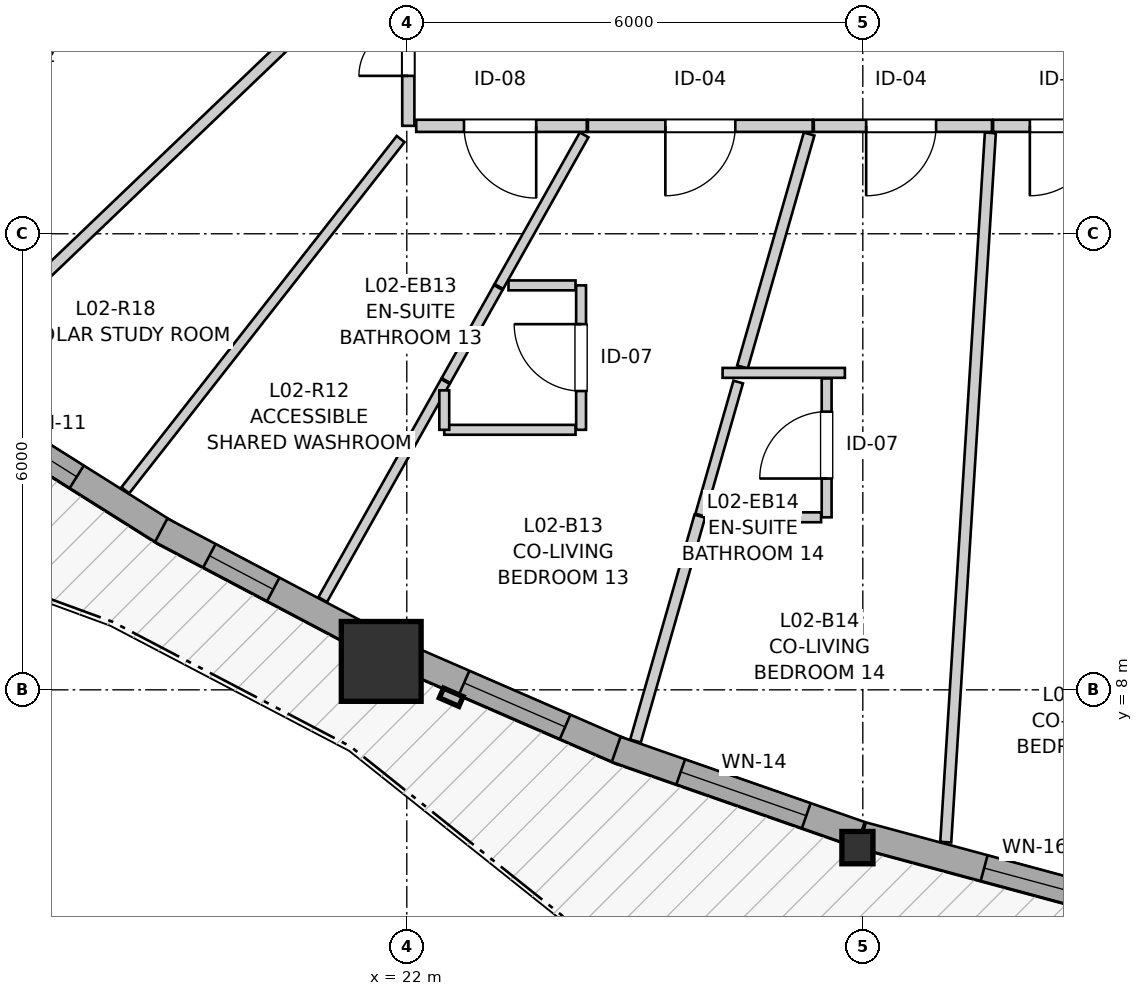
"""IFC4 building model, lengths in metres.
Left out: names, types, materials, properties, quantities, classifications, styles, units other than length and angle.
Written with IfcOpenShell. Run it as: python <this file> out.ifc"""

import sys

from ifc_helpers import new_model, si_unit, direction, frame, frame_2d, origin, origin_2d, place, context, subcontext, project, spatial, rectangle, i_section, extrude, source, transform, mapped, element, fill, save


model = new_model("IFC4")
c1 = context("Model", 3, precision=1e-05, world=origin(), true_north=direction((0.0, 1.0)))
c2 = subcontext(c1, "Body", "Model", "MODEL_VIEW")
j1 = project(units=[si_unit("LENGTHUNIT", "METRE"), si_unit("PLANEANGLEUNIT", "RADIAN")], contexts=[c1])
p1 = place(None, origin())
s1 = spatial("IfcSite", under=j1, at=p1, CompositionType="ELEMENT")
p2 = place(p1, origin())
s2 = spatial("IfcBuilding", under=s1, at=p2, CompositionType="ELEMENT")
p3 = place(p2, frame((0.0, 0.0, 11.0)))
s3 = spatial("IfcBuildingStorey", under=s2, at=p3, CompositionType="ELEMENT", Elevation=11.0)
m1 = source(origin(), c2, "Body", "SweptSolid", [
    extrude(rectangle(XDim=1.05, YDim=1.05, at=origin_2d()), origin(), (0.0, 0.0, 1.0), 2.94),
])
p4 = place(p3, frame((21.664, 8.374, 0.0), z_axis=(0.0, 0.0, 1.0), x_axis=(1.0, 0.0, 0.0)))
e1 = element("IfcColumn", 1, at=p4, inside=s3, PredefinedType="COLUMN", context=c2, shape_type="MappedRepresentation", body=[
    mapped(m1, transform((0.0, 0.0, 0.0), x_axis=(1.0, 0.0, 0.0), y_axis=(0.0, 1.0, 0.0), z_axis=(0.0, 0.0, 1.0), scale=1.0)),
])
m2 = source(origin(), c2, "Body", "SweptSolid", [
    extrude(i_section(OverallWidth=0.409, OverallDepth=0.425, WebThickness=0.03, FlangeThickness=0.048, FilletRadius=0.015, at=origin_2d()), origin(), (0.0, 0.0, 1.0), 2.94),
])
p5 = place(p3, frame((27.929, 5.924, 0.0), z_axis=(0.0, 0.0, 1.0), x_axis=(1.0, 0.0, 0.0)))
e2 = element("IfcColumn", 2, at=p5, inside=s3, PredefinedType="PILASTER", context=c2, shape_type="MappedRepresentation", body=[
    mapped(m2, transform((0.0, 0.0, 0.0), x_axis=(1.0, 0.0, 0.0), y_axis=(0.0, 1.0, 0.0), z_axis=(0.0, 0.0, 1.0), scale=1.0)),
])
p6 = place(p3, frame((16.014, 11.837, 0.0), z_axis=(0.0, 0.0, 1.0), x_axis=(0.846420438233, -0.532515203295, 0.0)))
e3 = element("IfcWall", 3, at=p6, inside=s3, PredefinedType="SOLIDWALL", context=c2, shape_type="SweptSolid", body=[
    extrude(rectangle(XDim=3.346, YDim=0.35, at=frame_2d((1.673, 0.0))), origin(), (0.0, 0.0, 1.0), 2.42),
])
p7 = place(p6, frame((0.692, 0.0, 0.82)))
e4 = element("IfcOpeningElement", 4, at=p7, cuts=e3, PredefinedType="OPENING", context=c2, shape_type="SweptSolid", body=[
    extrude(rectangle(XDim=1.25, YDim=1.35, at=frame_2d((0.625, 0.675))), frame((0.0, 0.185, 0.0), z_axis=(0.0, -1.0, 0.0), x_axis=(1.0, 0.0, 0.0)), (0.0, 0.0, 1.0), 0.37),
])
p8 = place(p3, frame((18.769, 10.1, 0.0), z_axis=(0.0, 0.0, 1.0), x_axis=(0.884401188265, -0.466727477438, 0.0)))
e5 = element("IfcWall", 5, at=p8, inside=s3, PredefinedType="SOLIDWALL", context=c2, shape_type="SweptSolid", body=[
    extrude(rectangle(XDim=3.066, YDim=0.35, at=frame_2d((1.533, 0.0))), origin(), (0.0, 0.0, 1.0), 2.42),
])
p9 = place(p8, frame((0.717, 0.0, 0.82)))
e6 = element("IfcOpeningElement", 6, at=p9, cuts=e5, PredefinedType="OPENING", context=c2, shape_type="SweptSolid", body=[
    extrude(rectangle(XDim=0.95, YDim=1.35, at=frame_2d((0.475, 0.675))), frame((0.0, 0.185, 0.0), z_axis=(0.0, -1.0, 0.0), x_axis=(1.0, 0.0, 0.0)), (0.0, 0.0, 1.0), 0.37),
])
p10 = place(p3, frame((22.009, 8.415, 0.0), z_axis=(0.0, 0.0, 1.0), x_axis=(0.917077605242, -0.398708748292, 0.0)))
e7 = element("IfcWall", 7, at=p10, inside=s3, PredefinedType="SOLIDWALL", context=c2, shape_type="SweptSolid", body=[
    extrude(rectangle(XDim=3.085, YDim=0.35, at=frame_2d((1.542, 0.0))), origin(), (0.0, 0.0, 1.0), 2.42),
])
p11 = place(p10, frame((0.812, 0.0, 0.82)))
e8 = element("IfcOpeningElement", 8, at=p11, cuts=e7, PredefinedType="OPENING", context=c2, shape_type="SweptSolid", body=[
    extrude(rectangle(XDim=1.45, YDim=1.25, at=frame_2d((0.725, 0.625))), frame((0.0, 0.185, 0.0), z_axis=(0.0, -1.0, 0.0), x_axis=(1.0, 0.0, 0.0)), (0.0, 0.0, 1.0), 0.37),
])
p12 = place(p3, frame((24.755, 7.217, 0.0), z_axis=(0.0, 0.0, 1.0), x_axis=(0.944148800827, -0.329519410501, 0.0)))
e9 = element("IfcWall", 9, at=p12, inside=s3, PredefinedType="SOLIDWALL", context=c2, shape_type="SweptSolid", body=[
    extrude(rectangle(XDim=3.403, YDim=0.35, at=frame_2d((1.701, 0.0))), origin(), (0.0, 0.0, 1.0), 2.42),
])
p13 = place(p12, frame((0.899, 0.0, 0.82)))
e10 = element("IfcOpeningElement", 10, at=p13, cuts=e9, PredefinedType="OPENING", context=c2, shape_type="SweptSolid", body=[
    extrude(rectangle(XDim=1.75, YDim=1.3, at=frame_2d((0.875, 0.65))), frame((0.0, 0.185, 0.0), z_axis=(0.0, -1.0, 0.0), x_axis=(1.0, 0.0, 0.0)), (0.0, 0.0, 1.0), 0.37),
])
p14 = place(p3, frame((27.994, 6.088, 0.0), z_axis=(0.0, 0.0, 1.0), x_axis=(0.965452701472, -0.260578359079, 0.0)))
e11 = element("IfcWall", 11, at=p14, inside=s3, PredefinedType="SOLIDWALL", context=c2, shape_type="SweptSolid", body=[
    extrude(rectangle(XDim=3.459, YDim=0.35, at=frame_2d((1.729, 0.0))), origin(), (0.0, 0.0, 1.0), 2.42),
])
p15 = place(p14, frame((1.66, 0.0, 0.82)))
e12 = element("IfcOpeningElement", 12, at=p15, cuts=e11, PredefinedType="OPENING", context=c2, shape_type="SweptSolid", body=[
    extrude(rectangle(XDim=1.15, YDim=1.2, at=frame_2d((0.575, 0.6))), frame((0.0, 0.185, 0.0), z_axis=(0.0, -1.0, 0.0), x_axis=(1.0, 0.0, 0.0)), (0.0, 0.0, 1.0), 0.37),
])
p16 = place(p3, frame((27.34, 15.42, 0.0), z_axis=(0.0, 0.0, 1.0), x_axis=(-1.0, 0.0, 0.0)))
e13 = element("IfcWall", 13, at=p16, inside=s3, PredefinedType="PARTITIONING", context=c2, shape_type="SweptSolid", body=[
    extrude(rectangle(XDim=2.957, YDim=0.16, at=frame_2d((1.479, 0.0))), origin(), (0.0, 0.0, 1.0), 2.94),
])
p17 = place(p16, frame((1.018, 0.0, 0.0)))
e14 = element("IfcOpeningElement", 14, at=p17, cuts=e13, PredefinedType="OPENING", context=c2, shape_type="SweptSolid", body=[
    extrude(rectangle(XDim=0.92, YDim=2.1, at=frame_2d((0.46, 1.05))), frame((0.0, 0.09, 0.0), z_axis=(0.0, -1.0, 0.0), x_axis=(1.0, 0.0, 0.0)), (0.0, 0.0, 1.0), 0.18),
])
p18 = place(p3, frame((22.02, 15.42, 0.0), z_axis=(0.0, 0.0, 1.0), x_axis=(0.0, 1.0, 0.0)))
e15 = element("IfcWall", 15, at=p18, inside=s3, PredefinedType="PARTITIONING", context=c2, shape_type="SweptSolid", body=[
    extrude(rectangle(XDim=2.579, YDim=0.16, at=frame_2d((1.29, 0.0))), origin(), (0.0, 0.0, 1.0), 2.94),
])
p19 = place(p18, frame((0.657, 0.0, 0.0)))
e16 = element("IfcOpeningElement", 16, at=p19, cuts=e15, PredefinedType="OPENING", context=c2, shape_type="SweptSolid", body=[
    extrude(rectangle(XDim=1.3, YDim=2.1, at=frame_2d((0.65, 1.05))), frame((0.0, 0.09, 0.0), z_axis=(0.0, -1.0, 0.0), x_axis=(1.0, 0.0, 0.0)), (0.0, 0.0, 1.0), 0.18),
])
p20 = place(p3, frame((29.699, 15.42, 0.0), z_axis=(0.0, 0.0, 1.0), x_axis=(-1.0, 0.0, 0.0)))
e17 = element("IfcWall", 17, at=p20, inside=s3, PredefinedType="PARTITIONING", context=c2, shape_type="SweptSolid", body=[
    extrude(rectangle(XDim=2.344, YDim=0.16, at=frame_2d((1.172, 0.0))), origin(), (0.0, 0.0, 1.0), 2.94),
])
p21 = place(p20, frame((0.735, 0.0, 0.0)))
e18 = element("IfcOpeningElement", 18, at=p21, cuts=e17, PredefinedType="OPENING", context=c2, shape_type="SweptSolid", body=[
    extrude(rectangle(XDim=0.92, YDim=2.1, at=frame_2d((0.46, 1.05))), frame((0.0, 0.09, 0.0), z_axis=(0.0, -1.0, 0.0), x_axis=(1.0, 0.0, 0.0)), (0.0, 0.0, 1.0), 0.18),
])
p22 = place(p3, frame((24.368, 15.42, 0.0), z_axis=(0.0, 0.0, 1.0), x_axis=(-1.0, 0.0, 0.0)))
e19 = element("IfcWall", 19, at=p22, inside=s3, PredefinedType="PARTITIONING", context=c2, shape_type="SweptSolid", body=[
    extrude(rectangle(XDim=2.244, YDim=0.16, at=frame_2d((1.122, 0.0))), origin(), (0.0, 0.0, 1.0), 2.94),
])
p23 = place(p22, frame((0.666, 0.0, 0.0)))
e20 = element("IfcOpeningElement", 20, at=p23, cuts=e19, PredefinedType="OPENING", context=c2, shape_type="SweptSolid", body=[
    extrude(rectangle(XDim=0.95, YDim=2.1, at=frame_2d((0.475, 1.05))), frame((0.0, 0.09, 0.0), z_axis=(0.0, -1.0, 0.0), x_axis=(1.0, 0.0, 0.0)), (0.0, 0.0, 1.0), 0.18),
])
p24 = place(p3, frame((31.646, 15.42, 0.0), z_axis=(0.0, 0.0, 1.0), x_axis=(-1.0, 0.0, 0.0)))
e21 = element("IfcWall", 21, at=p24, inside=s3, PredefinedType="PARTITIONING", context=c2, shape_type="SweptSolid", body=[
    extrude(rectangle(XDim=1.932, YDim=0.16, at=frame_2d((0.966, 0.0))), origin(), (0.0, 0.0, 1.0), 2.94),
])
p25 = place(p24, frame((0.529, 0.0, 0.0)))
e22 = element("IfcOpeningElement", 22, at=p25, cuts=e21, PredefinedType="OPENING", context=c2, shape_type="SweptSolid", body=[
    extrude(rectangle(XDim=0.92, YDim=2.1, at=frame_2d((0.46, 1.05))), frame((0.0, 0.09, 0.0), z_axis=(0.0, -1.0, 0.0), x_axis=(1.0, 0.0, 0.0)), (0.0, 0.0, 1.0), 0.18),
])
p26 = place(p3, frame((24.293, 11.421, 0.0), z_axis=(0.0, 0.0, 1.0), x_axis=(0.0, 1.0, 0.0)))
e23 = element("IfcWall", 23, at=p26, inside=s3, PredefinedType="PARTITIONING", context=c2, shape_type="SweptSolid", body=[
    extrude(rectangle(XDim=1.9, YDim=0.13, at=frame_2d((0.95, 0.0))), origin(), (0.0, 0.0, 1.0), 2.94),
])
p27 = place(p26, frame((0.51, 0.0, 0.0)))
e24 = element("IfcOpeningElement", 24, at=p27, cuts=e23, PredefinedType="OPENING", context=c2, shape_type="SweptSolid", body=[
    extrude(rectangle(XDim=0.88, YDim=2.05, at=frame_2d((0.44, 1.025))), frame((0.0, 0.075, 0.0), z_axis=(0.0, -1.0, 0.0), x_axis=(1.0, 0.0, 0.0)), (0.0, 0.0, 1.0), 0.15),
])
p28 = place(p3, frame((27.524, 10.27, 0.0), z_axis=(0.0, 0.0, 1.0), x_axis=(0.0, 1.0, 0.0)))
e25 = element("IfcWall", 25, at=p28, inside=s3, PredefinedType="PARTITIONING", context=c2, shape_type="SweptSolid", body=[
    extrude(rectangle(XDim=1.827, YDim=0.13, at=frame_2d((0.914, 0.0))), origin(), (0.0, 0.0, 1.0), 2.94),
])
p29 = place(p28, frame((0.51, 0.0, 0.0)))
e26 = element("IfcOpeningElement", 26, at=p29, cuts=e25, PredefinedType="OPENING", context=c2, shape_type="SweptSolid", body=[
    extrude(rectangle(XDim=0.88, YDim=2.05, at=frame_2d((0.44, 1.025))), frame((0.0, 0.075, 0.0), z_axis=(0.0, -1.0, 0.0), x_axis=(1.0, 0.0, 0.0)), (0.0, 0.0, 1.0), 0.15),
])
p30 = place(p3, frame((29.091, 5.996, 0.0), z_axis=(0.0, 0.0, 1.0), x_axis=(0.062797687125, 0.998026277456, 0.0)))
e27 = element("IfcWall", 27, at=p30, inside=s3, PredefinedType="PARTITIONING", context=c2, shape_type="SweptSolid", body=[
    extrude(rectangle(XDim=9.35, YDim=0.145, at=frame_2d((4.675, 0.0))), origin(), (0.0, 0.0, 1.0), 2.94),
])
p31 = place(p3, frame((15.888, 12.171, 0.0), z_axis=(0.0, 0.0, 1.0), x_axis=(0.722733244608, 0.691127091886, 0.0)))
e28 = element("IfcWall", 28, at=p31, inside=s3, PredefinedType="PARTITIONING", context=c2, shape_type="SweptSolid", body=[
    extrude(rectangle(XDim=8.296, YDim=0.145, at=frame_2d((4.148, 0.0))), origin(), (0.0, 0.0, 1.0), 2.94),
])
p32 = place(p3, frame((18.296, 10.625, 0.0), z_axis=(0.0, 0.0, 1.0), x_axis=(0.616906721473, 0.787036274261, 0.0)))
e29 = element("IfcWall", 29, at=p32, inside=s3, PredefinedType="PARTITIONING", context=c2, shape_type="SweptSolid", body=[
    extrude(rectangle(XDim=5.872, YDim=0.13, at=frame_2d((2.936, 0.0))), origin(), (0.0, 0.0, 1.0), 2.94),
])
p33 = place(p3, frame((26.417, 12.248, 0.0), z_axis=(0.0, 0.0, 1.0), x_axis=(0.275014447674, 0.961440093594, 0.0)))
e30 = element("IfcWall", 30, at=p33, inside=s3, PredefinedType="PARTITIONING", context=c2, shape_type="SweptSolid", body=[
    extrude(rectangle(XDim=3.188, YDim=0.145, at=frame_2d((1.594, 0.0))), origin(), (0.0, 0.0, 1.0), 2.94),
])
p34 = place(p3, frame((20.894, 9.187, 0.0), z_axis=(0.0, 0.0, 1.0), x_axis=(0.490433761368, 0.871478471169, 0.0)))
e31 = element("IfcWall", 31, at=p34, inside=s3, PredefinedType="PARTITIONING", context=c2, shape_type="SweptSolid", body=[
    extrude(rectangle(XDim=3.292, YDim=0.13, at=frame_2d((1.646, 0.0))), origin(), (0.0, 0.0, 1.0), 2.94),
])
p35 = place(p3, frame((25.009, 7.327, 0.0), z_axis=(0.0, 0.0, 1.0), x_axis=(0.274867847045, 0.961482015776, 0.0)))
e32 = element("IfcWall", 32, at=p35, inside=s3, PredefinedType="PARTITIONING", context=c2, shape_type="SweptSolid", body=[
    extrude(rectangle(XDim=3.077, YDim=0.145, at=frame_2d((1.538, 0.0))), origin(), (0.0, 0.0, 1.0), 2.94),
])
p36 = place(p3, frame((23.211, 13.306, 0.0), z_axis=(0.0, 0.0, 1.0), x_axis=(0.490235923681, 0.871589776864, 0.0)))
e33 = element("IfcWall", 33, at=p36, inside=s3, PredefinedType="PARTITIONING", context=c2, shape_type="SweptSolid", body=[
    extrude(rectangle(XDim=2.289, YDim=0.13, at=frame_2d((1.145, 0.0))), origin(), (0.0, 0.0, 1.0), 2.94),
])
p37 = place(p3, frame((25.86, 10.299, 0.0), z_axis=(0.0, 0.0, 1.0), x_axis=(0.275022188369, 0.961437879379, 0.0)))
e34 = element("IfcWall", 34, at=p37, inside=s3, PredefinedType="PARTITIONING", context=c2, shape_type="SweptSolid", body=[
    extrude(rectangle(XDim=1.821, YDim=0.13, at=frame_2d((0.91, 0.0))), origin(), (0.0, 0.0, 1.0), 2.94),
])
p38 = place(p3, frame((22.493, 11.421, 0.0), z_axis=(0.0, 0.0, 1.0), x_axis=(1.0, 0.0, 0.0)))
e35 = element("IfcWall", 35, at=p38, inside=s3, PredefinedType="PARTITIONING", context=c2, shape_type="SweptSolid", body=[
    extrude(rectangle(XDim=1.727, YDim=0.13, at=frame_2d((0.864, 0.0))), origin(), (0.0, 0.0, 1.0), 2.508),
])
p39 = place(p3, frame((25.953, 10.27, 0.0), z_axis=(0.0, 0.0, 1.0), x_axis=(1.0, 0.0, 0.0)))
e36 = element("IfcWall", 36, at=p39, inside=s3, PredefinedType="PARTITIONING", context=c2, shape_type="SweptSolid", body=[
    extrude(rectangle(XDim=1.498, YDim=0.13, at=frame_2d((0.749, 0.0))), origin(), (0.0, 0.0, 1.0), 2.508),
])
p40 = place(p3, frame((22.515, 12.069, 0.0), z_axis=(0.0, 0.0, 1.0), x_axis=(0.490286002917, 0.871561607314, 0.0)))
e37 = element("IfcWall", 37, at=p40, inside=s3, PredefinedType="PARTITIONING", context=c2, shape_type="SweptSolid", body=[
    extrude(rectangle(XDim=1.404, YDim=0.13, at=frame_2d((0.702, 0.0))), origin(), (0.0, 0.0, 1.0), 2.94),
])
p41 = place(p3, frame((26.155, 12.17, 0.0), z_axis=(0.0, 0.0, 1.0), x_axis=(1.0, 0.0, 0.0)))
e38 = element("IfcWall", 38, at=p41, inside=s3, PredefinedType="PARTITIONING", context=c2, shape_type="SweptSolid", body=[
    extrude(rectangle(XDim=1.609, YDim=0.13, at=frame_2d((0.804, 0.0))), origin(), (0.0, 0.0, 1.0), 2.94),
])
p42 = place(p3, frame((23.338, 13.321, 0.0), z_axis=(0.0, 0.0, 1.0), x_axis=(1.0, 0.0, 0.0)))
e39 = element("IfcWall", 39, at=p42, inside=s3, PredefinedType="PARTITIONING", context=c2, shape_type="SweptSolid", body=[
    extrude(rectangle(XDim=0.882, YDim=0.13, at=frame_2d((0.441, 0.0))), origin(), (0.0, 0.0, 1.0), 2.94),
])
p43 = place(p3, frame((22.493, 11.421, 0.0), z_axis=(0.0, 0.0, 1.0), x_axis=(0.0, 1.0, 0.0)))
e40 = element("IfcWall", 40, at=p43, inside=s3, PredefinedType="PARTITIONING", context=c2, shape_type="SweptSolid", body=[
    extrude(rectangle(XDim=0.519, YDim=0.13, at=frame_2d((0.26, 0.0))), origin(), (0.0, 0.0, 1.0), 2.94),
])
m3 = source(origin(), c2, "Body", "SweptSolid", [
    extrude(rectangle(XDim=1.25, YDim=1.35, at=frame_2d((0.625, 0.675))), frame((0.0, 0.03, 0.0), z_axis=(0.0, -1.0, 0.0), x_axis=(1.0, 0.0, 0.0)), (0.0, 0.0, 1.0), 0.06),
])
p44 = place(p7, origin())
e41 = element("IfcWindow", 41, at=p44, inside=s3, PartitioningType="SINGLE_PANEL", PredefinedType="WINDOW", context=c2, shape_type="MappedRepresentation", body=[
    mapped(m3, transform((0.0, 0.0, 0.0), x_axis=(1.0, 0.0, 0.0), y_axis=(0.0, 1.0, 0.0), z_axis=(0.0, 0.0, 1.0), scale=1.0)),
])
fill(e4, e41)
m4 = source(origin(), c2, "Body", "SweptSolid", [
    extrude(rectangle(XDim=0.95, YDim=1.35, at=frame_2d((0.475, 0.675))), frame((0.0, 0.03, 0.0), z_axis=(0.0, -1.0, 0.0), x_axis=(1.0, 0.0, 0.0)), (0.0, 0.0, 1.0), 0.06),
])
p45 = place(p9, origin())
e42 = element("IfcWindow", 42, at=p45, inside=s3, PartitioningType="SINGLE_PANEL", PredefinedType="WINDOW", context=c2, shape_type="MappedRepresentation", body=[
    mapped(m4, transform((0.0, 0.0, 0.0), x_axis=(1.0, 0.0, 0.0), y_axis=(0.0, 1.0, 0.0), z_axis=(0.0, 0.0, 1.0), scale=1.0)),
])
fill(e6, e42)
m5 = source(origin(), c2, "Body", "SweptSolid", [
    extrude(rectangle(XDim=1.45, YDim=1.25, at=frame_2d((0.725, 0.625))), frame((0.0, 0.03, 0.0), z_axis=(0.0, -1.0, 0.0), x_axis=(1.0, 0.0, 0.0)), (0.0, 0.0, 1.0), 0.06),
])
p46 = place(p11, origin())
e43 = element("IfcWindow", 43, at=p46, inside=s3, PartitioningType="SINGLE_PANEL", PredefinedType="WINDOW", context=c2, shape_type="MappedRepresentation", body=[
    mapped(m5, transform((0.0, 0.0, 0.0), x_axis=(1.0, 0.0, 0.0), y_axis=(0.0, 1.0, 0.0), z_axis=(0.0, 0.0, 1.0), scale=1.0)),
])
fill(e8, e43)
m6 = source(origin(), c2, "Body", "SweptSolid", [
    extrude(rectangle(XDim=1.75, YDim=1.3, at=frame_2d((0.875, 0.65))), frame((0.0, 0.03, 0.0), z_axis=(0.0, -1.0, 0.0), x_axis=(1.0, 0.0, 0.0)), (0.0, 0.0, 1.0), 0.06),
])
p47 = place(p13, origin())
e44 = element("IfcWindow", 44, at=p47, inside=s3, PartitioningType="SINGLE_PANEL", PredefinedType="WINDOW", context=c2, shape_type="MappedRepresentation", body=[
    mapped(m6, transform((0.0, 0.0, 0.0), x_axis=(1.0, 0.0, 0.0), y_axis=(0.0, 1.0, 0.0), z_axis=(0.0, 0.0, 1.0), scale=1.0)),
])
fill(e10, e44)
m7 = source(origin(), c2, "Body", "SweptSolid", [
    extrude(rectangle(XDim=1.15, YDim=1.2, at=frame_2d((0.575, 0.6))), frame((0.0, 0.03, 0.0), z_axis=(0.0, -1.0, 0.0), x_axis=(1.0, 0.0, 0.0)), (0.0, 0.0, 1.0), 0.06),
])
p48 = place(p15, origin())
e45 = element("IfcWindow", 45, at=p48, inside=s3, PartitioningType="SINGLE_PANEL", PredefinedType="WINDOW", context=c2, shape_type="MappedRepresentation", body=[
    mapped(m7, transform((0.0, 0.0, 0.0), x_axis=(1.0, 0.0, 0.0), y_axis=(0.0, 1.0, 0.0), z_axis=(0.0, 0.0, 1.0), scale=1.0)),
])
fill(e12, e45)
m8 = source(origin(), c2, "Body", "SweptSolid", [
    extrude(rectangle(XDim=0.92, YDim=2.1, at=frame_2d((0.46, 1.05))), frame((0.0, 0.025, 0.0), z_axis=(0.0, -1.0, 0.0), x_axis=(1.0, 0.0, 0.0)), (0.0, 0.0, 1.0), 0.05),
])
p49 = place(p17, origin())
e46 = element("IfcDoor", 46, at=p49, inside=s3, OperationType="SINGLE_SWING_RIGHT", PredefinedType="DOOR", context=c2, shape_type="MappedRepresentation", body=[
    mapped(m8, transform((0.0, 0.0, 0.0), x_axis=(1.0, 0.0, 0.0), y_axis=(0.0, 1.0, 0.0), z_axis=(0.0, 0.0, 1.0), scale=1.0)),
])
fill(e14, e46)
m9 = source(origin(), c2, "Body", "SweptSolid", [
    extrude(rectangle(XDim=1.3, YDim=2.1, at=frame_2d((0.65, 1.05))), frame((0.0, 0.025, 0.0), z_axis=(0.0, -1.0, 0.0), x_axis=(1.0, 0.0, 0.0)), (0.0, 0.0, 1.0), 0.05),
])
p50 = place(p19, origin())
e47 = element("IfcDoor", 47, at=p50, inside=s3, OperationType="DOUBLE_DOOR_SINGLE_SWING", PredefinedType="DOOR", context=c2, shape_type="MappedRepresentation", body=[
    mapped(m9, transform((0.0, 0.0, 0.0), x_axis=(1.0, 0.0, 0.0), y_axis=(0.0, 1.0, 0.0), z_axis=(0.0, 0.0, 1.0), scale=1.0)),
])
fill(e16, e47)
p51 = place(p21, origin())
e48 = element("IfcDoor", 48, at=p51, inside=s3, OperationType="SINGLE_SWING_RIGHT", PredefinedType="DOOR", context=c2, shape_type="MappedRepresentation", body=[
    mapped(m8, transform((0.0, 0.0, 0.0), x_axis=(1.0, 0.0, 0.0), y_axis=(0.0, 1.0, 0.0), z_axis=(0.0, 0.0, 1.0), scale=1.0)),
])
fill(e18, e48)
m10 = source(origin(), c2, "Body", "SweptSolid", [
    extrude(rectangle(XDim=0.95, YDim=2.1, at=frame_2d((0.475, 1.05))), frame((0.0, 0.025, 0.0), z_axis=(0.0, -1.0, 0.0), x_axis=(1.0, 0.0, 0.0)), (0.0, 0.0, 1.0), 0.05),
])
p52 = place(p23, origin())
e49 = element("IfcDoor", 49, at=p52, inside=s3, OperationType="SINGLE_SWING_LEFT", PredefinedType="DOOR", context=c2, shape_type="MappedRepresentation", body=[
    mapped(m10, transform((0.0, 0.0, 0.0), x_axis=(1.0, 0.0, 0.0), y_axis=(0.0, 1.0, 0.0), z_axis=(0.0, 0.0, 1.0), scale=1.0)),
])
fill(e20, e49)
p53 = place(p25, origin())
e50 = element("IfcDoor", 50, at=p53, inside=s3, OperationType="SINGLE_SWING_RIGHT", PredefinedType="DOOR", context=c2, shape_type="MappedRepresentation", body=[
    mapped(m8, transform((0.0, 0.0, 0.0), x_axis=(1.0, 0.0, 0.0), y_axis=(0.0, 1.0, 0.0), z_axis=(0.0, 0.0, 1.0), scale=1.0)),
])
fill(e22, e50)
m11 = source(origin(), c2, "Body", "SweptSolid", [
    extrude(rectangle(XDim=0.88, YDim=2.05, at=frame_2d((0.44, 1.025))), frame((0.0, 0.025, 0.0), z_axis=(0.0, -1.0, 0.0), x_axis=(1.0, 0.0, 0.0)), (0.0, 0.0, 1.0), 0.05),
])
p54 = place(p27, origin())
e51 = element("IfcDoor", 51, at=p54, inside=s3, OperationType="SINGLE_SWING_RIGHT", PredefinedType="DOOR", context=c2, shape_type="MappedRepresentation", body=[
    mapped(m11, transform((0.0, 0.0, 0.0), x_axis=(1.0, 0.0, 0.0), y_axis=(0.0, 1.0, 0.0), z_axis=(0.0, 0.0, 1.0), scale=1.0)),
])
fill(e24, e51)
p55 = place(p29, origin())
e52 = element("IfcDoor", 52, at=p55, inside=s3, OperationType="SINGLE_SWING_LEFT", PredefinedType="DOOR", context=c2, shape_type="MappedRepresentation", body=[
    mapped(m11, transform((0.0, 0.0, 0.0), x_axis=(1.0, 0.0, 0.0), y_axis=(0.0, 1.0, 0.0), z_axis=(0.0, 0.0, 1.0), scale=1.0)),
])
fill(e26, e52)
save(model, sys.argv[1])
